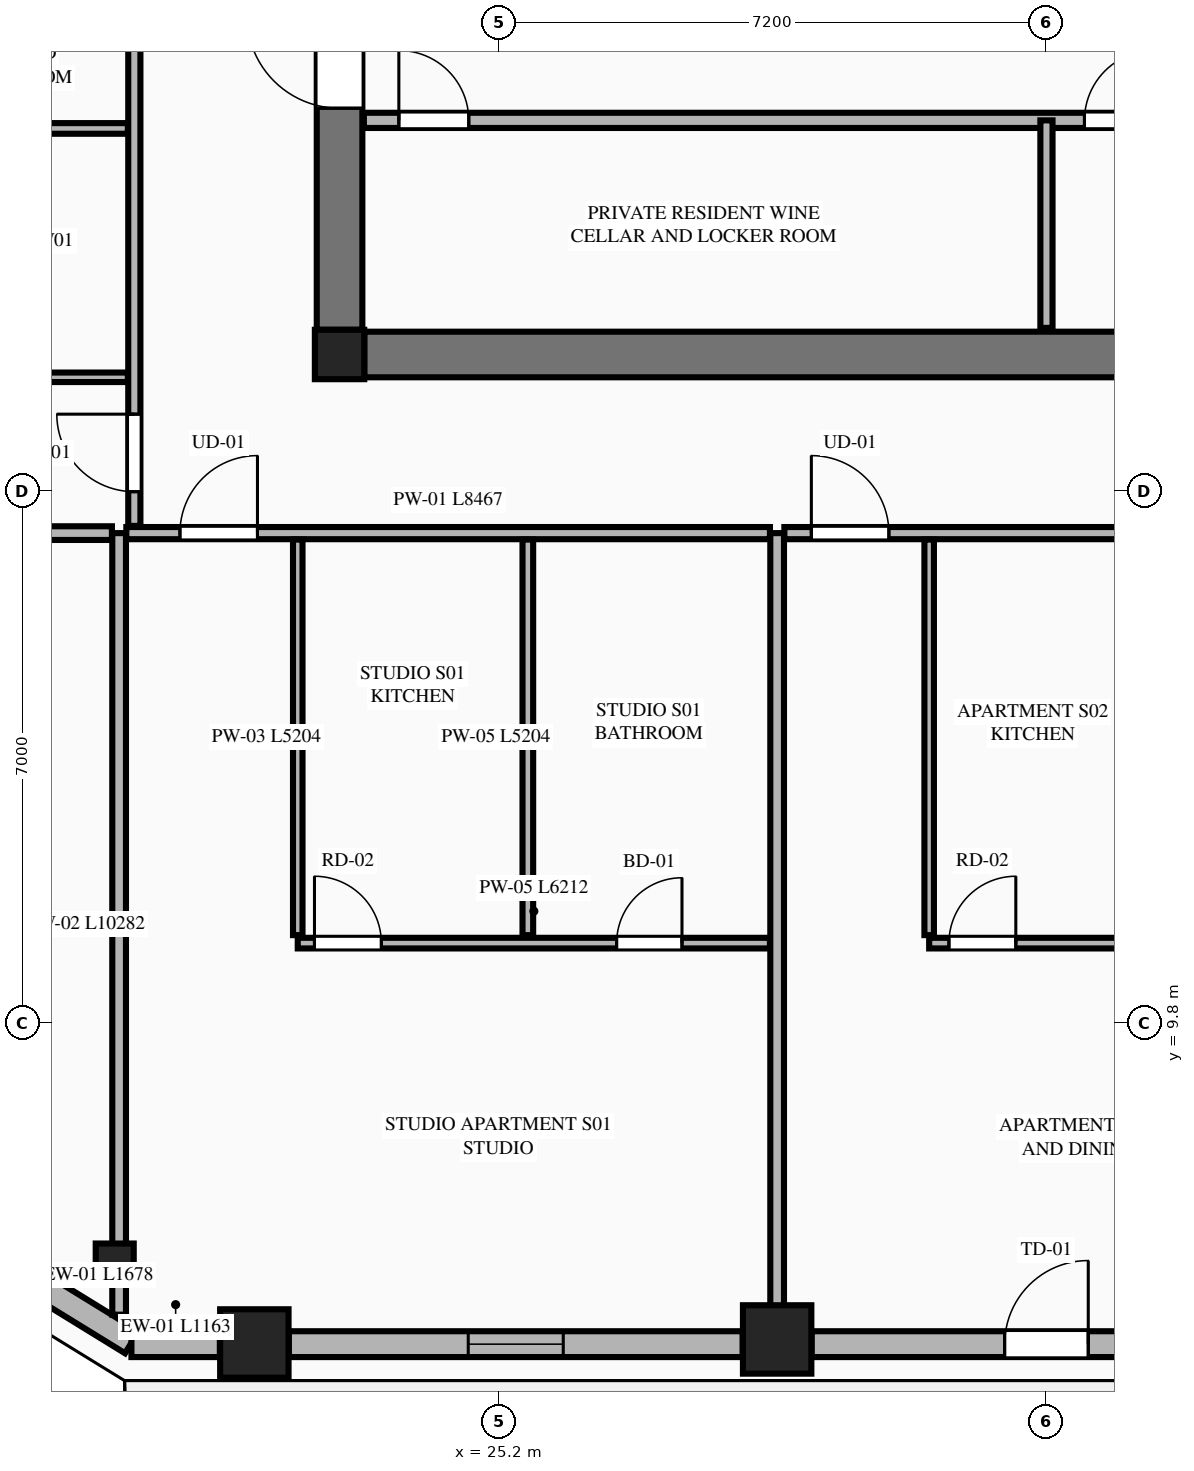
"""IFC4 building model, lengths in metres.
Left out: names, types, materials, properties, quantities, classifications, styles, units other than length and angle.
Written with IfcOpenShell. Run it as: python <this file> out.ifc"""

import sys

from ifc_helpers import new_model, si_unit, direction, frame, frame_2d, origin, origin_2d, place, context, subcontext, project, spatial, rectangle, extrude, element, fill, save


model = new_model("IFC4")
c1 = context("Model", 3, precision=1e-05, world=origin(), true_north=direction((0.0, 1.0)))
c2 = subcontext(c1, "Body", "Model", "MODEL_VIEW")
j1 = project(units=[si_unit("LENGTHUNIT", "METRE"), si_unit("PLANEANGLEUNIT", "RADIAN")], contexts=[c1])
p1 = place(None, origin())
s1 = spatial("IfcSite", under=j1, at=p1, CompositionType="ELEMENT")
p2 = place(p1, origin())
s2 = spatial("IfcBuilding", under=s1, at=p2, CompositionType="ELEMENT")
p3 = place(p2, frame((0.0, 0.0, 179.0)))
s3 = spatial("IfcBuildingStorey", under=s2, at=p3, CompositionType="ELEMENT", Elevation=179.0)
p4 = place(p3, frame((23.1, 18.6, 0.0), z_axis=(0.0, 0.0, 1.0), x_axis=(1.0, 0.0, 0.0)))
e1 = element("IfcColumn", 1, at=p4, inside=s3, PredefinedType="COLUMN", context=c2, shape_type="SweptSolid", body=[
    extrude(rectangle(XDim=0.65, YDim=0.65, at=origin_2d()), origin(), (0.0, 0.0, 1.0), 3.55),
])
p5 = place(p3, frame((23.425, 18.6, 0.0), z_axis=(0.0, 0.0, 1.0), x_axis=(1.0, 0.0, 0.0)))
e2 = element("IfcWall", 2, at=p5, inside=s3, PredefinedType="SHEAR", context=c2, shape_type="SweptSolid", body=[
    extrude(rectangle(XDim=17.95, YDim=0.6, at=frame_2d((8.975, 0.0))), origin(), (0.0, 0.0, 1.0), 3.35),
])
p6 = place(p3, frame((23.1, 18.925, 0.0), z_axis=(0.0, 0.0, 1.0), x_axis=(0.0, 1.0, 0.0)))
e3 = element("IfcWall", 3, at=p6, inside=s3, PredefinedType="SHEAR", context=c2, shape_type="SweptSolid", body=[
    extrude(rectangle(XDim=13.95, YDim=0.6, at=frame_2d((6.975, 0.0))), origin(), (0.0, 0.0, 1.0), 3.35),
])
p7 = place(p6, frame((2.915, 0.0, 0.0)))
e4 = element("IfcOpeningElement", 4, at=p7, cuts=e3, PredefinedType="OPENING", context=c2, shape_type="SweptSolid", body=[
    extrude(rectangle(XDim=1.22, YDim=2.25, at=frame_2d((0.61, 1.125))), frame((0.0, 0.31, 0.0), z_axis=(0.0, -1.0, 0.0), x_axis=(1.0, 0.0, 0.0)), (0.0, 0.0, 1.0), 0.62),
])
for number, where, z_axis, x_axis in (
    (5, (21.979, 5.589, 0.0), (0.0, 0.0, 1.0), (1.0, 0.0, 0.0)),
    (6, (28.857, 5.642, 0.0), (0.0, 0.0, 1.0), (1.0, 0.0, 0.0)),
):
    element("IfcColumn", number, at=place(p3, frame(where, z_axis=z_axis, x_axis=x_axis)), inside=s3, PredefinedType="COLUMN", context=c2, shape_type="SweptSolid", body=[
        extrude(rectangle(XDim=0.9, YDim=0.9, at=origin_2d()), origin(), (0.0, 0.0, 1.0), 3.55),
    ])
p8 = place(p3, frame((20.142, 6.654, 0.0), z_axis=(0.0, 0.0, 1.0), x_axis=(0.865230187018, -0.501374833306, 0.0)))
e7 = element("IfcColumn", 7, at=p8, inside=s3, PredefinedType="PILASTER", context=c2, shape_type="SweptSolid", body=[
    extrude(rectangle(XDim=0.5, YDim=0.35, at=origin_2d()), origin(), (0.0, 0.0, 1.0), 3.55),
])
p9 = place(p3, frame((23.42, 21.68, 0.0), z_axis=(0.0, 0.0, 1.0), x_axis=(1.0, 0.0, 0.0)))
e8 = element("IfcWall", 8, at=p9, inside=s3, PredefinedType="PLUMBINGWALL", context=c2, shape_type="SweptSolid", body=[
    extrude(rectangle(XDim=17.96, YDim=0.2, at=frame_2d((8.98, 0.0))), origin(), (0.0, 0.0, 1.0), 3.35),
])
p10 = place(p9, frame((0.46, 0.0, 0.0)))
e9 = element("IfcOpeningElement", 9, at=p10, cuts=e8, PredefinedType="OPENING", context=c2, shape_type="SweptSolid", body=[
    extrude(rectangle(XDim=0.92, YDim=2.15, at=frame_2d((0.46, 1.075))), frame((0.0, 0.11, 0.0), z_axis=(0.0, -1.0, 0.0), x_axis=(1.0, 0.0, 0.0)), (0.0, 0.0, 1.0), 0.22),
])
p11 = place(p9, frame((9.48, 0.0, 0.0)))
e10 = element("IfcOpeningElement", 10, at=p11, cuts=e8, PredefinedType="OPENING", context=c2, shape_type="SweptSolid", body=[
    extrude(rectangle(XDim=0.92, YDim=2.15, at=frame_2d((0.46, 1.075))), frame((0.0, 0.11, 0.0), z_axis=(0.0, -1.0, 0.0), x_axis=(1.0, 0.0, 0.0)), (0.0, 0.0, 1.0), 0.22),
])
p12 = place(p3, frame((32.4, 18.95, 0.0), z_axis=(0.0, 0.0, 1.0), x_axis=(0.0, 1.0, 0.0)))
e11 = element("IfcWall", 11, at=p12, inside=s3, PredefinedType="PARTITIONING", context=c2, shape_type="SweptSolid", body=[
    extrude(rectangle(XDim=2.73, YDim=0.16, at=frame_2d((1.365, 0.0))), origin(), (0.0, 0.0, 1.0), 3.35),
])
p13 = place(p3, frame((18.938, 6.484, 0.0), z_axis=(0.0, 0.0, 1.0), x_axis=(0.851778214877, -0.523902541185, 0.0)))
e12 = element("IfcWall", 12, at=p13, inside=s3, PredefinedType="STANDARD", context=c2, shape_type="SweptSolid", body=[
    extrude(rectangle(XDim=1.678, YDim=0.34, at=frame_2d((0.839, 0.0))), origin(), (0.0, 0.0, 1.0), 3.35),
])
p14 = place(p3, frame((20.362, 5.58, 0.0), z_axis=(0.0, 0.0, 1.0), x_axis=(1.0, 0.0, 0.0)))
e13 = element("IfcWall", 13, at=p14, inside=s3, PredefinedType="STANDARD", context=c2, shape_type="SweptSolid", body=[
    extrude(rectangle(XDim=1.163, YDim=0.34, at=frame_2d((0.582, 0.0))), origin(), (0.0, 0.0, 1.0), 3.35),
])
p15 = place(p3, frame((22.433, 5.58, 0.0), z_axis=(0.0, 0.0, 1.0), x_axis=(1.0, 0.0, 0.0)))
e14 = element("IfcWall", 14, at=p15, inside=s3, PredefinedType="STANDARD", context=c2, shape_type="SweptSolid", body=[
    extrude(rectangle(XDim=5.97, YDim=0.34, at=frame_2d((2.985, 0.0))), origin(), (0.0, 0.0, 1.0), 2.883),
])
p16 = place(p15, frame((2.36, 0.0, 0.75)))
e15 = element("IfcOpeningElement", 15, at=p16, cuts=e14, PredefinedType="OPENING", context=c2, shape_type="SweptSolid", body=[
    extrude(rectangle(XDim=1.25, YDim=1.95, at=frame_2d((0.625, 0.975))), frame((0.0, 0.18, 0.0), z_axis=(0.0, -1.0, 0.0), x_axis=(1.0, 0.0, 0.0)), (0.0, 0.0, 1.0), 0.36),
])
p17 = place(p3, frame((29.311, 5.58, 0.0), z_axis=(0.0, 0.0, 1.0), x_axis=(1.0, 0.0, 0.0)))
e16 = element("IfcWall", 16, at=p17, inside=s3, PredefinedType="STANDARD", context=c2, shape_type="SweptSolid", body=[
    extrude(rectangle(XDim=6.178, YDim=0.34, at=frame_2d((3.089, 0.0))), origin(), (0.0, 0.0, 1.0), 2.883),
])
p18 = place(p17, frame((2.539, 0.0, 0.0)))
e17 = element("IfcOpeningElement", 17, at=p18, cuts=e16, PredefinedType="OPENING", context=c2, shape_type="SweptSolid", body=[
    extrude(rectangle(XDim=1.1, YDim=2.25, at=frame_2d((0.55, 1.125))), frame((0.0, 0.18, 0.0), z_axis=(0.0, -1.0, 0.0), x_axis=(1.0, 0.0, 0.0)), (0.0, 0.0, 1.0), 0.36),
])
p19 = place(p3, frame((20.2, 5.968, 0.0), z_axis=(0.0, 0.0, 1.0), x_axis=(0.0, 1.0, 0.0)))
e18 = element("IfcWall", 18, at=p19, inside=s3, PredefinedType="PARTITIONING", context=c2, shape_type="SweptSolid", body=[
    extrude(rectangle(XDim=10.282, YDim=0.18, at=frame_2d((5.141, 0.0))), origin(), (0.0, 0.0, 1.0), 3.35),
])
p20 = place(p3, frame((28.857, 5.755, 0.0), z_axis=(0.0, 0.0, 1.0), x_axis=(0.0, 1.0, 0.0)))
e19 = element("IfcWall", 19, at=p20, inside=s3, PredefinedType="PARTITIONING", context=c2, shape_type="SweptSolid", body=[
    extrude(rectangle(XDim=10.495, YDim=0.18, at=frame_2d((5.248, 0.0))), origin(), (0.0, 0.0, 1.0), 2.807),
])
p21 = place(p3, frame((20.295, 16.25, 0.0), z_axis=(0.0, 0.0, 1.0), x_axis=(1.0, 0.0, 0.0)))
e20 = element("IfcWall", 20, at=p21, inside=s3, PredefinedType="PARTITIONING", context=c2, shape_type="SweptSolid", body=[
    extrude(rectangle(XDim=8.467, YDim=0.16, at=frame_2d((4.233, 0.0))), origin(), (0.0, 0.0, 1.0), 3.35),
])
p22 = place(p21, frame((0.705, 0.0, 0.0)))
e21 = element("IfcOpeningElement", 21, at=p22, cuts=e20, PredefinedType="OPENING", context=c2, shape_type="SweptSolid", body=[
    extrude(rectangle(XDim=1.02, YDim=2.25, at=frame_2d((0.51, 1.125))), frame((0.0, 0.09, 0.0), z_axis=(0.0, -1.0, 0.0), x_axis=(1.0, 0.0, 0.0)), (0.0, 0.0, 1.0), 0.18),
])
p23 = place(p3, frame((22.55, 10.961, 0.0), z_axis=(0.0, 0.0, 1.0), x_axis=(0.0, 1.0, 0.0)))
e22 = element("IfcWall", 22, at=p23, inside=s3, PredefinedType="PARTITIONING", context=c2, shape_type="SweptSolid", body=[
    extrude(rectangle(XDim=5.204, YDim=0.125, at=frame_2d((2.602, 0.0))), origin(), (0.0, 0.0, 1.0), 2.807),
])
p24 = place(p3, frame((22.55, 10.856, 0.0), z_axis=(0.0, 0.0, 1.0), x_axis=(1.0, 0.0, 0.0)))
e23 = element("IfcWall", 23, at=p24, inside=s3, PredefinedType="PLUMBINGWALL", context=c2, shape_type="SweptSolid", body=[
    extrude(rectangle(XDim=6.212, YDim=0.14, at=frame_2d((3.106, 0.0))), origin(), (0.0, 0.0, 1.0), 3.35),
])
p25 = place(p24, frame((4.195, 0.0, 0.0)))
e24 = element("IfcOpeningElement", 24, at=p25, cuts=e23, PredefinedType="OPENING", context=c2, shape_type="SweptSolid", body=[
    extrude(rectangle(XDim=0.86, YDim=2.1, at=frame_2d((0.43, 1.05))), frame((0.0, 0.08, 0.0), z_axis=(0.0, -1.0, 0.0), x_axis=(1.0, 0.0, 0.0)), (0.0, 0.0, 1.0), 0.16),
])
p26 = place(p24, frame((0.22, 0.0, 0.0)))
e25 = element("IfcOpeningElement", 25, at=p26, cuts=e23, PredefinedType="OPENING", context=c2, shape_type="SweptSolid", body=[
    extrude(rectangle(XDim=0.88, YDim=2.15, at=frame_2d((0.44, 1.075))), frame((0.0, 0.08, 0.0), z_axis=(0.0, -1.0, 0.0), x_axis=(1.0, 0.0, 0.0)), (0.0, 0.0, 1.0), 0.16),
])
p27 = place(p3, frame((25.577, 10.961, 0.0), z_axis=(0.0, 0.0, 1.0), x_axis=(0.0, 1.0, 0.0)))
e26 = element("IfcWall", 26, at=p27, inside=s3, PredefinedType="PLUMBINGWALL", context=c2, shape_type="SweptSolid", body=[
    extrude(rectangle(XDim=5.204, YDim=0.14, at=frame_2d((2.602, 0.0))), origin(), (0.0, 0.0, 1.0), 3.35),
])
p28 = place(p3, frame((28.952, 16.25, 0.0), z_axis=(0.0, 0.0, 1.0), x_axis=(1.0, 0.0, 0.0)))
e27 = element("IfcWall", 27, at=p28, inside=s3, PredefinedType="PARTITIONING", context=c2, shape_type="SweptSolid", body=[
    extrude(rectangle(XDim=15.553, YDim=0.16, at=frame_2d((7.776, 0.0))), origin(), (0.0, 0.0, 1.0), 3.35),
])
p29 = place(p28, frame((0.355, 0.0, 0.0)))
e28 = element("IfcOpeningElement", 28, at=p29, cuts=e27, PredefinedType="OPENING", context=c2, shape_type="SweptSolid", body=[
    extrude(rectangle(XDim=1.02, YDim=2.25, at=frame_2d((0.51, 1.125))), frame((0.0, 0.09, 0.0), z_axis=(0.0, -1.0, 0.0), x_axis=(1.0, 0.0, 0.0)), (0.0, 0.0, 1.0), 0.18),
])
p30 = place(p3, frame((30.857, 10.961, 0.0), z_axis=(0.0, 0.0, 1.0), x_axis=(0.0, 1.0, 0.0)))
e29 = element("IfcWall", 29, at=p30, inside=s3, PredefinedType="PARTITIONING", context=c2, shape_type="SweptSolid", body=[
    extrude(rectangle(XDim=5.204, YDim=0.125, at=frame_2d((2.602, 0.0))), origin(), (0.0, 0.0, 1.0), 3.35),
])
p31 = place(p3, frame((30.857, 10.856, 0.0), z_axis=(0.0, 0.0, 1.0), x_axis=(1.0, 0.0, 0.0)))
e30 = element("IfcWall", 30, at=p31, inside=s3, PredefinedType="PLUMBINGWALL", context=c2, shape_type="SweptSolid", body=[
    extrude(rectangle(XDim=5.242, YDim=0.14, at=frame_2d((2.621, 0.0))), origin(), (0.0, 0.0, 1.0), 3.35),
])
p32 = place(p31, frame((3.559, 0.0, 0.0)))
e31 = element("IfcOpeningElement", 31, at=p32, cuts=e30, PredefinedType="OPENING", context=c2, shape_type="SweptSolid", body=[
    extrude(rectangle(XDim=0.86, YDim=2.1, at=frame_2d((0.43, 1.05))), frame((0.0, 0.08, 0.0), z_axis=(0.0, -1.0, 0.0), x_axis=(1.0, 0.0, 0.0)), (0.0, 0.0, 1.0), 0.16),
])
p33 = place(p31, frame((0.26, 0.0, 0.0)))
e32 = element("IfcOpeningElement", 32, at=p33, cuts=e30, PredefinedType="OPENING", context=c2, shape_type="SweptSolid", body=[
    extrude(rectangle(XDim=0.88, YDim=2.15, at=frame_2d((0.44, 1.075))), frame((0.0, 0.08, 0.0), z_axis=(0.0, -1.0, 0.0), x_axis=(1.0, 0.0, 0.0)), (0.0, 0.0, 1.0), 0.16),
])
p34 = place(p3, frame((14.211, 16.25, 0.0), z_axis=(0.0, 0.0, 1.0), x_axis=(1.0, 0.0, 0.0)))
e33 = element("IfcWall", 33, at=p34, inside=s3, PredefinedType="PARTITIONING", context=c2, shape_type="SweptSolid", body=[
    extrude(rectangle(XDim=5.894, YDim=0.18, at=frame_2d((2.947, 0.0))), origin(), (0.0, 0.0, 1.0), 3.35),
])
p35 = place(p3, frame((20.4, 16.345, 0.0), z_axis=(0.0, 0.0, 1.0), x_axis=(0.0, 1.0, 0.0)))
e34 = element("IfcWall", 34, at=p35, inside=s3, PredefinedType="PARTITIONING", context=c2, shape_type="SweptSolid", body=[
    extrude(rectangle(XDim=18.71, YDim=0.16, at=frame_2d((9.355, 0.0))), origin(), (0.0, 0.0, 1.0), 3.35),
])
p36 = place(p35, frame((0.45, 0.0, 0.0)))
e35 = element("IfcOpeningElement", 35, at=p36, cuts=e34, PredefinedType="OPENING", context=c2, shape_type="SweptSolid", body=[
    extrude(rectangle(XDim=1.02, YDim=2.25, at=frame_2d((0.51, 1.125))), frame((0.0, 0.09, 0.0), z_axis=(0.0, -1.0, 0.0), x_axis=(1.0, 0.0, 0.0)), (0.0, 0.0, 1.0), 0.18),
])
p37 = place(p3, frame((16.485, 18.3, 0.0), z_axis=(0.0, 0.0, 1.0), x_axis=(1.0, 0.0, 0.0)))
e36 = element("IfcWall", 36, at=p37, inside=s3, PredefinedType="PARTITIONING", context=c2, shape_type="SweptSolid", body=[
    extrude(rectangle(XDim=3.83, YDim=0.125, at=frame_2d((1.915, 0.0))), origin(), (0.0, 0.0, 1.0), 2.807),
])
p38 = place(p3, frame((16.485, 21.574, 0.0), z_axis=(0.0, 0.0, 1.0), x_axis=(1.0, 0.0, 0.0)))
e37 = element("IfcWall", 37, at=p38, inside=s3, PredefinedType="PLUMBINGWALL", context=c2, shape_type="SweptSolid", body=[
    extrude(rectangle(XDim=3.83, YDim=0.14, at=frame_2d((1.915, 0.0))), origin(), (0.0, 0.0, 1.0), 3.35),
])
p39 = place(p7, origin())
e38 = element("IfcDoor", 38, at=p39, inside=s3, OperationType="SINGLE_SWING_RIGHT", PredefinedType="DOOR", context=c2, shape_type="SweptSolid", body=[
    extrude(rectangle(XDim=1.22, YDim=2.25, at=frame_2d((0.61, 1.125))), frame((0.0, 0.025, 0.0), z_axis=(0.0, -1.0, 0.0), x_axis=(1.0, 0.0, 0.0)), (0.0, 0.0, 1.0), 0.05),
])
fill(e4, e38)
p40 = place(p10, origin())
e39 = element("IfcDoor", 39, at=p40, inside=s3, OperationType="SINGLE_SWING_LEFT", PredefinedType="DOOR", context=c2, shape_type="SweptSolid", body=[
    extrude(rectangle(XDim=0.92, YDim=2.15, at=frame_2d((0.46, 1.075))), frame((0.0, 0.025, 0.0), z_axis=(0.0, -1.0, 0.0), x_axis=(1.0, 0.0, 0.0)), (0.0, 0.0, 1.0), 0.05),
])
fill(e9, e39)
p41 = place(p11, origin())
e40 = element("IfcDoor", 40, at=p41, inside=s3, OperationType="SINGLE_SWING_RIGHT", PredefinedType="DOOR", context=c2, shape_type="SweptSolid", body=[
    extrude(rectangle(XDim=0.92, YDim=2.15, at=frame_2d((0.46, 1.075))), frame((0.0, 0.025, 0.0), z_axis=(0.0, -1.0, 0.0), x_axis=(1.0, 0.0, 0.0)), (0.0, 0.0, 1.0), 0.05),
])
fill(e10, e40)
p42 = place(p16, origin())
e41 = element("IfcWindow", 41, at=p42, inside=s3, PartitioningType="SINGLE_PANEL", PredefinedType="WINDOW", context=c2, shape_type="SweptSolid", body=[
    extrude(rectangle(XDim=1.25, YDim=1.95, at=frame_2d((0.625, 0.975))), frame((0.0, 0.03, 0.0), z_axis=(0.0, -1.0, 0.0), x_axis=(1.0, 0.0, 0.0)), (0.0, 0.0, 1.0), 0.06),
])
fill(e15, e41)
p43 = place(p18, origin())
e42 = element("IfcDoor", 42, at=p43, inside=s3, OperationType="SINGLE_SWING_RIGHT", PredefinedType="DOOR", context=c2, shape_type="SweptSolid", body=[
    extrude(rectangle(XDim=1.1, YDim=2.25, at=frame_2d((0.55, 1.125))), frame((0.0, 0.025, 0.0), z_axis=(0.0, -1.0, 0.0), x_axis=(1.0, 0.0, 0.0)), (0.0, 0.0, 1.0), 0.05),
])
fill(e17, e42)
p44 = place(p25, origin())
e43 = element("IfcDoor", 43, at=p44, inside=s3, OperationType="SINGLE_SWING_RIGHT", PredefinedType="DOOR", context=c2, shape_type="SweptSolid", body=[
    extrude(rectangle(XDim=0.86, YDim=2.1, at=frame_2d((0.43, 1.05))), frame((0.0, 0.025, 0.0), z_axis=(0.0, -1.0, 0.0), x_axis=(1.0, 0.0, 0.0)), (0.0, 0.0, 1.0), 0.05),
])
fill(e24, e43)
p45 = place(p22, origin())
e44 = element("IfcDoor", 44, at=p45, inside=s3, OperationType="SINGLE_SWING_RIGHT", PredefinedType="DOOR", context=c2, shape_type="SweptSolid", body=[
    extrude(rectangle(XDim=1.02, YDim=2.25, at=frame_2d((0.51, 1.125))), frame((0.0, 0.025, 0.0), z_axis=(0.0, -1.0, 0.0), x_axis=(1.0, 0.0, 0.0)), (0.0, 0.0, 1.0), 0.05),
])
fill(e21, e44)
p46 = place(p26, origin())
e45 = element("IfcDoor", 45, at=p46, inside=s3, OperationType="SINGLE_SWING_LEFT", PredefinedType="DOOR", context=c2, shape_type="SweptSolid", body=[
    extrude(rectangle(XDim=0.88, YDim=2.15, at=frame_2d((0.44, 1.075))), frame((0.0, 0.025, 0.0), z_axis=(0.0, -1.0, 0.0), x_axis=(1.0, 0.0, 0.0)), (0.0, 0.0, 1.0), 0.05),
])
fill(e25, e45)
p47 = place(p29, origin())
e46 = element("IfcDoor", 46, at=p47, inside=s3, OperationType="SINGLE_SWING_LEFT", PredefinedType="DOOR", context=c2, shape_type="SweptSolid", body=[
    extrude(rectangle(XDim=1.02, YDim=2.25, at=frame_2d((0.51, 1.125))), frame((0.0, 0.025, 0.0), z_axis=(0.0, -1.0, 0.0), x_axis=(1.0, 0.0, 0.0)), (0.0, 0.0, 1.0), 0.05),
])
fill(e28, e46)
p48 = place(p33, origin())
e47 = element("IfcDoor", 47, at=p48, inside=s3, OperationType="SINGLE_SWING_RIGHT", PredefinedType="DOOR", context=c2, shape_type="SweptSolid", body=[
    extrude(rectangle(XDim=0.88, YDim=2.15, at=frame_2d((0.44, 1.075))), frame((0.0, 0.025, 0.0), z_axis=(0.0, -1.0, 0.0), x_axis=(1.0, 0.0, 0.0)), (0.0, 0.0, 1.0), 0.05),
])
fill(e32, e47)
p49 = place(p36, origin())
e48 = element("IfcDoor", 48, at=p49, inside=s3, OperationType="SINGLE_SWING_RIGHT", PredefinedType="DOOR", context=c2, shape_type="SweptSolid", body=[
    extrude(rectangle(XDim=1.02, YDim=2.25, at=frame_2d((0.51, 1.125))), frame((0.0, 0.025, 0.0), z_axis=(0.0, -1.0, 0.0), x_axis=(1.0, 0.0, 0.0)), (0.0, 0.0, 1.0), 0.05),
])
fill(e35, e48)
save(model, sys.argv[1])
